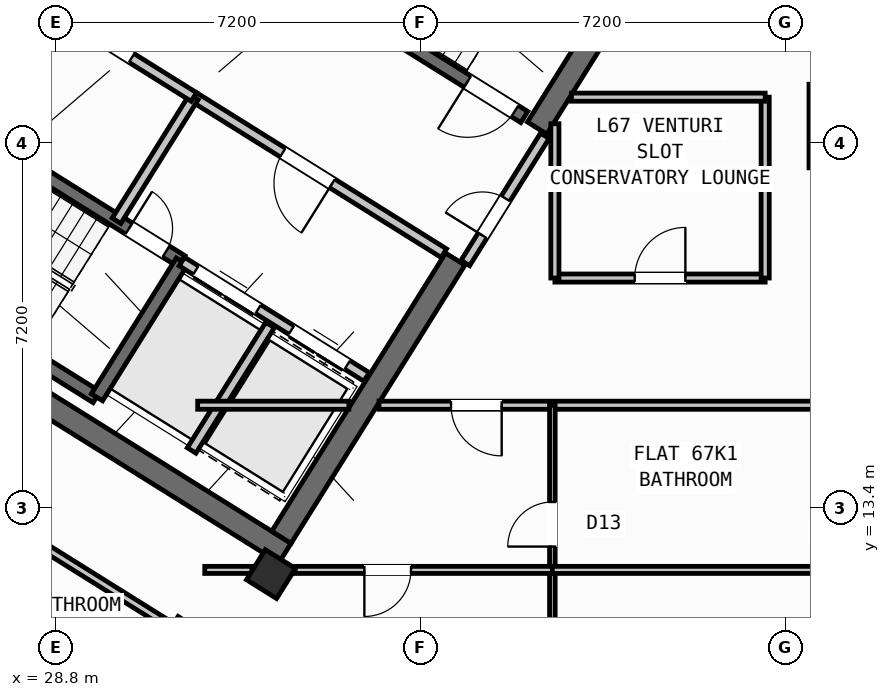
"""IFC4 building model, lengths in metres.
Left out: names, types, materials, properties, quantities, classifications, styles, units other than length and angle.
Written with IfcOpenShell. Run it as: python <this file> out.ifc"""

import sys

from ifc_helpers import new_model, si_unit, direction, frame, frame_2d, origin, origin_2d, place, context, subcontext, project, spatial, rectangle, hollow_rectangle, extrude, source, transform, mapped, element, fill, save


model = new_model("IFC4")
c1 = context("Model", 3, precision=1e-05, world=origin(), true_north=direction((0.0, 1.0)))
c2 = subcontext(c1, "Body", "Model", "MODEL_VIEW")
j1 = project(units=[si_unit("LENGTHUNIT", "METRE"), si_unit("PLANEANGLEUNIT", "RADIAN")], contexts=[c1])
p1 = place(None, origin())
s1 = spatial("IfcSite", under=j1, at=p1, CompositionType="ELEMENT")
p2 = place(p1, origin())
s2 = spatial("IfcBuilding", under=s1, at=p2, CompositionType="ELEMENT")
p3 = place(p2, frame((0.0, 0.0, 266.4)))
s3 = spatial("IfcBuildingStorey", under=s2, at=p3, CompositionType="ELEMENT", Elevation=266.4)
p4 = place(p3, frame((33.324, 12.503, 0.0), z_axis=(0.0, 0.0, 1.0), x_axis=(-0.848043529849, 0.529926571782, 0.0)))
e1 = element("IfcWall", 1, at=p4, inside=s3, PredefinedType="SHEAR", context=c2, shape_type="SweptSolid", body=[
    extrude(rectangle(XDim=13.04, YDim=0.45, at=frame_2d((6.52, 0.0))), origin(), (0.0, 0.0, 1.0), 3.35),
])
p5 = place(p3, frame((40.221, 23.965, 0.0), z_axis=(0.0, 0.0, 1.0), x_axis=(-0.529902075036, -0.848058836916, 0.0)))
e2 = element("IfcWall", 2, at=p5, inside=s3, PredefinedType="SHEAR", context=c2, shape_type="SweptSolid", body=[
    extrude(rectangle(XDim=3.625, YDim=0.45, at=frame_2d((1.812, 0.0))), origin(), (0.0, 0.0, 1.0), 3.35),
])
p6 = place(p3, frame((36.683, 18.304, 0.0), z_axis=(0.0, 0.0, 1.0), x_axis=(-0.529904039071, -0.848057609704, 0.0)))
e3 = element("IfcWall", 3, at=p6, inside=s3, PredefinedType="SHEAR", context=c2, shape_type="SweptSolid", body=[
    extrude(rectangle(XDim=6.475, YDim=0.45, at=frame_2d((3.238, 0.0))), origin(), (0.0, 0.0, 1.0), 3.35),
])
m1 = source(origin(), c2, "Body", "SweptSolid", [
    extrude(hollow_rectangle(XDim=0.7, YDim=0.7, WallThickness=0.028, at=origin_2d()), origin(), (0.0, 0.0, 1.0), 3.6),
])
p7 = place(p3, frame((33.046, 12.087, 0.0), z_axis=(0.0, 0.0, 1.0), x_axis=(-0.848048096156, 0.529919264233, 0.0)))
e4 = element("IfcColumn", 4, at=p7, inside=s3, PredefinedType="COLUMN", context=c2, shape_type="MappedRepresentation", body=[
    mapped(m1, transform((0.0, 0.0, 0.0), scale=1.0)),
])
p8 = place(p3, frame((29.268, 6.429, 0.0), z_axis=(0.0, 0.0, 1.0), x_axis=(-0.848049971435, 0.529916263149, 0.0)))
e5 = element("IfcWall", 5, at=p8, inside=s3, PredefinedType="STANDARD", context=c2, shape_type="SweptSolid", body=[
    extrude(rectangle(XDim=31.588, YDim=0.32, at=frame_2d((15.794, 0.0))), origin(), (0.0, 0.0, 1.0), 3.35),
])
p9 = place(p8, frame((16.362, 0.0, 0.0)))
e6 = element("IfcOpeningElement", 6, at=p9, cuts=e5, PredefinedType="OPENING", context=c2, shape_type="SweptSolid", body=[
    extrude(rectangle(XDim=1.2, YDim=2.15, at=frame_2d((0.6, 1.075))), frame((0.0, 0.17, 0.0), z_axis=(0.0, -1.0, 0.0), x_axis=(1.0, 0.0, 0.0)), (0.0, 0.0, 1.0), 0.34),
])
p10 = place(p8, frame((3.859, 0.0, 0.9)))
e7 = element("IfcOpeningElement", 7, at=p10, cuts=e5, PredefinedType="OPENING", context=c2, shape_type="SweptSolid", body=[
    extrude(rectangle(XDim=1.65, YDim=1.45, at=frame_2d((0.825, 0.725))), frame((0.0, 0.17, 0.0), z_axis=(0.0, -1.0, 0.0), x_axis=(1.0, 0.0, 0.0)), (0.0, 0.0, 1.0), 0.34),
])
p11 = place(p8, frame((10.519, 0.0, 0.9)))
e8 = element("IfcOpeningElement", 8, at=p11, cuts=e5, PredefinedType="OPENING", context=c2, shape_type="SweptSolid", body=[
    extrude(rectangle(XDim=1.65, YDim=1.45, at=frame_2d((0.825, 0.725))), frame((0.0, 0.17, 0.0), z_axis=(0.0, -1.0, 0.0), x_axis=(1.0, 0.0, 0.0)), (0.0, 0.0, 1.0), 0.34),
])
p12 = place(p8, frame((21.219, 0.0, 0.95)))
e9 = element("IfcOpeningElement", 9, at=p12, cuts=e5, PredefinedType="OPENING", context=c2, shape_type="SweptSolid", body=[
    extrude(rectangle(XDim=1.95, YDim=1.35, at=frame_2d((0.975, 0.675))), frame((0.0, 0.17, 0.0), z_axis=(0.0, -1.0, 0.0), x_axis=(1.0, 0.0, 0.0)), (0.0, 0.0, 1.0), 0.34),
])
p13 = place(p8, frame((26.406, 0.0, 1.0)))
e10 = element("IfcOpeningElement", 10, at=p13, cuts=e5, PredefinedType="OPENING", context=c2, shape_type="SweptSolid", body=[
    extrude(rectangle(XDim=0.9, YDim=1.25, at=frame_2d((0.45, 0.625))), frame((0.0, 0.17, 0.0), z_axis=(0.0, -1.0, 0.0), x_axis=(1.0, 0.0, 0.0)), (0.0, 0.0, 1.0), 0.34),
])
p14 = place(p8, frame((29.143, 0.0, 0.9)))
e11 = element("IfcOpeningElement", 11, at=p14, cuts=e5, PredefinedType="OPENING", context=c2, shape_type="SweptSolid", body=[
    extrude(rectangle(XDim=1.65, YDim=1.45, at=frame_2d((0.825, 0.725))), frame((0.0, 0.17, 0.0), z_axis=(0.0, -1.0, 0.0), x_axis=(1.0, 0.0, 0.0)), (0.0, 0.0, 1.0), 0.34),
])
p15 = place(p3, frame((29.605, 15.581, 0.0), z_axis=(0.0, 0.0, 1.0), x_axis=(-0.848036911448, 0.529937163087, 0.0)))
e12 = element("IfcWall", 12, at=p15, inside=s3, PredefinedType="SHEAR", context=c2, shape_type="SweptSolid", body=[
    extrude(rectangle(XDim=7.46, YDim=0.26, at=frame_2d((3.73, 0.0))), origin(), (0.0, 0.0, 1.0), 3.35),
])
p16 = place(p3, frame((31.28, 18.261, 0.0), z_axis=(0.0, 0.0, 1.0), x_axis=(-0.848051618787, 0.529913626805, 0.0)))
e13 = element("IfcWall", 13, at=p16, inside=s3, PredefinedType="SHEAR", context=c2, shape_type="SweptSolid", body=[
    extrude(rectangle(XDim=7.46, YDim=0.26, at=frame_2d((3.73, 0.0))), origin(), (0.0, 0.0, 1.0), 3.35),
])
p17 = place(p16, frame((0.36, 0.0, 0.0)))
e14 = element("IfcOpeningElement", 14, at=p17, cuts=e13, PredefinedType="OPENING", context=c2, shape_type="SweptSolid", body=[
    extrude(rectangle(XDim=0.86, YDim=2.05, at=frame_2d((0.43, 1.025))), frame((0.0, 0.14, 0.0), z_axis=(0.0, -1.0, 0.0), x_axis=(1.0, 0.0, 0.0)), (0.0, 0.0, 1.0), 0.28),
])
p18 = place(p3, frame((31.288, 18.256, 0.0), z_axis=(0.0, 0.0, 1.0), x_axis=(-0.529943379326, -0.848033026897, 0.0)))
e15 = element("IfcWall", 15, at=p18, inside=s3, PredefinedType="SHEAR", context=c2, shape_type="SweptSolid", body=[
    extrude(rectangle(XDim=3.16, YDim=0.26, at=frame_2d((1.58, 0.0))), origin(), (0.0, 0.0, 1.0), 3.35),
])
p19 = place(p3, frame((38.046, 21.108, 0.0), z_axis=(0.0, 0.0, 1.0), x_axis=(-0.848054434086, 0.529909121291, 0.0)))
e16 = element("IfcWall", 16, at=p19, inside=s3, PredefinedType="SHEAR", context=c2, shape_type="SweptSolid", body=[
    extrude(rectangle(XDim=7.33, YDim=0.26, at=frame_2d((3.665, 0.0))), origin(), (0.0, 0.0, 1.0), 3.35),
])
p20 = place(p19, frame((0.22, 0.0, 0.0)))
e17 = element("IfcOpeningElement", 17, at=p20, cuts=e16, PredefinedType="OPENING", context=c2, shape_type="SweptSolid", body=[
    extrude(rectangle(XDim=1.1, YDim=2.1, at=frame_2d((0.55, 1.05))), frame((0.0, 0.14, 0.0), z_axis=(0.0, -1.0, 0.0), x_axis=(1.0, 0.0, 0.0)), (0.0, 0.0, 1.0), 0.28),
])
p21 = place(p3, frame((34.933, 15.978, 0.0), z_axis=(0.0, 0.0, 1.0), x_axis=(-0.848055739377, 0.529907032327, 0.0)))
e18 = element("IfcWall", 18, at=p21, inside=s3, PredefinedType="STANDARD", context=c2, shape_type="SweptSolid", body=[
    extrude(rectangle(XDim=4.298, YDim=0.2, at=frame_2d((2.149, 0.0))), origin(), (0.0, 0.0, 1.0), 3.34),
])
p22 = place(p21, frame((0.448, 0.0, 0.0)))
e19 = element("IfcOpeningElement", 19, at=p22, cuts=e18, PredefinedType="OPENING", context=c2, shape_type="SweptSolid", body=[
    extrude(rectangle(XDim=1.3, YDim=2.2, at=frame_2d((0.65, 1.1))), frame((0.0, 0.11, 0.0), z_axis=(0.0, -1.0, 0.0), x_axis=(1.0, 0.0, 0.0)), (0.0, 0.0, 1.0), 0.22),
])
p23 = place(p21, frame((2.523, 0.0, 0.0)))
e20 = element("IfcOpeningElement", 20, at=p23, cuts=e18, PredefinedType="OPENING", context=c2, shape_type="SweptSolid", body=[
    extrude(rectangle(XDim=1.45, YDim=2.25, at=frame_2d((0.725, 1.125))), frame((0.0, 0.11, 0.0), z_axis=(0.0, -1.0, 0.0), x_axis=(1.0, 0.0, 0.0)), (0.0, 0.0, 1.0), 0.22),
])
p24 = place(p3, frame((36.459, 18.421, 0.0), z_axis=(0.0, 0.0, 1.0), x_axis=(-0.848059591691, 0.529900867089, 0.0)))
e21 = element("IfcWall", 21, at=p24, inside=s3, PredefinedType="STANDARD", context=c2, shape_type="SweptSolid", body=[
    extrude(rectangle(XDim=5.818, YDim=0.2, at=frame_2d((2.909, 0.0))), origin(), (0.0, 0.0, 1.0), 3.34),
])
p25 = place(p24, frame((2.598, 0.0, 0.0)))
e22 = element("IfcOpeningElement", 22, at=p25, cuts=e21, PredefinedType="OPENING", context=c2, shape_type="SweptSolid", body=[
    extrude(rectangle(XDim=1.15, YDim=2.1, at=frame_2d((0.575, 1.05))), frame((0.0, 0.11, 0.0), z_axis=(0.0, -1.0, 0.0), x_axis=(1.0, 0.0, 0.0)), (0.0, 0.0, 1.0), 0.22),
])
p26 = place(p3, frame((33.029, 17.003, 0.0), z_axis=(0.0, 0.0, 1.0), x_axis=(-0.529916267533, -0.848049968695, 0.0)))
e23 = element("IfcWall", 23, at=p26, inside=s3, PredefinedType="STANDARD", context=c2, shape_type="SweptSolid", body=[
    extrude(rectangle(XDim=2.92, YDim=0.2, at=frame_2d((1.46, 0.0))), origin(), (0.0, 0.0, 1.0), 3.34),
])
for number, where, z_axis, x_axis in (
    (24, (31.525, 21.504, 0.0), (0.0, 0.0, 1.0), (-0.53, -0.848, 0.0)),
    (25, (28.71, 23.263, 0.0), (0.0, 0.0, 1.0), (-0.53, -0.848, 0.0)),
):
    element("IfcWall", number, at=place(p3, frame(where, z_axis=z_axis, x_axis=x_axis)), inside=s3, PredefinedType="STANDARD", context=c2, shape_type="SweptSolid", body=[
        extrude(rectangle(XDim=2.88, YDim=0.2, at=frame_2d((1.44, 0.0))), origin(), (0.0, 0.0, 1.0), 3.34),
    ])
p27 = place(p3, frame((31.525, 21.504, 0.0), z_axis=(0.0, 0.0, 1.0), x_axis=(-0.848042066329, 0.529928913853, 0.0)))
e26 = element("IfcWall", 26, at=p27, inside=s3, PredefinedType="STANDARD", context=c2, shape_type="SweptSolid", body=[
    extrude(rectangle(XDim=6.268, YDim=0.2, at=frame_2d((3.134, 0.0))), origin(), (0.0, 0.0, 1.0), 3.34),
])
p28 = place(p27, frame((4.4, 0.0, 0.0)))
e27 = element("IfcOpeningElement", 27, at=p28, cuts=e26, PredefinedType="OPENING", context=c2, shape_type="SweptSolid", body=[
    extrude(rectangle(XDim=0.86, YDim=2.05, at=frame_2d((0.43, 1.025))), frame((0.0, 0.11, 0.0), z_axis=(0.0, -1.0, 0.0), x_axis=(1.0, 0.0, 0.0)), (0.0, 0.0, 1.0), 0.22),
])
p29 = place(p27, frame((1.45, 0.0, 0.0)))
e28 = element("IfcOpeningElement", 28, at=p29, cuts=e26, PredefinedType="OPENING", context=c2, shape_type="SweptSolid", body=[
    extrude(rectangle(XDim=0.86, YDim=2.05, at=frame_2d((0.43, 1.025))), frame((0.0, 0.11, 0.0), z_axis=(0.0, -1.0, 0.0), x_axis=(1.0, 0.0, 0.0)), (0.0, 0.0, 1.0), 0.22),
])
p30 = place(p3, frame((32.164, 10.374, 0.0), z_axis=(0.0, 0.0, 1.0), x_axis=(-0.848044107957, 0.529925646633, 0.0)))
e29 = element("IfcWall", 29, at=p30, inside=s3, PredefinedType="PARTITIONING", context=c2, shape_type="SweptSolid", body=[
    extrude(rectangle(XDim=15.57, YDim=0.16, at=frame_2d((7.785, 0.0))), origin(), (0.0, 0.0, 1.0), 3.34),
])
p31 = place(p30, frame((10.83, 0.0, 0.0)))
e30 = element("IfcOpeningElement", 30, at=p31, cuts=e29, PredefinedType="OPENING", context=c2, shape_type="SweptSolid", body=[
    extrude(rectangle(XDim=1.0, YDim=2.1, at=frame_2d((0.5, 1.05))), frame((0.0, 0.09, 0.0), z_axis=(0.0, -1.0, 0.0), x_axis=(1.0, 0.0, 0.0)), (0.0, 0.0, 1.0), 0.18),
])
p32 = place(p3, frame((31.282, 11.208, 0.0), z_axis=(0.0, 0.0, 1.0), x_axis=(-0.529938869374, -0.84803584519, 0.0)))
e31 = element("IfcWall", 31, at=p32, inside=s3, PredefinedType="PARTITIONING", context=c2, shape_type="SweptSolid", body=[
    extrude(rectangle(XDim=5.48, YDim=0.16, at=frame_2d((2.74, 0.0))), origin(), (0.0, 0.0, 1.0), 3.34),
])
p33 = place(p3, frame((29.72, 8.859, 0.0), z_axis=(0.0, 0.0, 1.0), x_axis=(-0.848049134363, 0.529917602752, 0.0)))
e32 = element("IfcWall", 32, at=p33, inside=s3, PredefinedType="PLUMBINGWALL", context=c2, shape_type="SweptSolid", body=[
    extrude(rectangle(XDim=14.3, YDim=0.14, at=frame_2d((7.15, 0.0))), origin(), (0.0, 0.0, 1.0), 3.34),
])
p34 = place(p33, frame((9.57, 0.0, 0.0)))
e33 = element("IfcOpeningElement", 33, at=p34, cuts=e32, PredefinedType="OPENING", context=c2, shape_type="SweptSolid", body=[
    extrude(rectangle(XDim=0.92, YDim=2.08, at=frame_2d((0.46, 1.04))), frame((0.0, 0.08, 0.0), z_axis=(0.0, -1.0, 0.0), x_axis=(1.0, 0.0, 0.0)), (0.0, 0.0, 1.0), 0.16),
])
p35 = place(p3, frame((38.451, 20.737, 0.0), z_axis=(0.0, 0.0, 1.0), x_axis=(-0.529924799939, -0.848044637038, 0.0)))
e34 = element("IfcWall", 34, at=p35, inside=s3, PredefinedType="STANDARD", context=c2, shape_type="SweptSolid", body=[
    extrude(rectangle(XDim=2.96, YDim=0.2, at=frame_2d((1.48, 0.0))), origin(), (0.0, 0.0, 1.0), 3.34),
])
p36 = place(p35, frame((1.46, 0.0, 0.0)))
e35 = element("IfcOpeningElement", 35, at=p36, cuts=e34, PredefinedType="OPENING", context=c2, shape_type="SweptSolid", body=[
    extrude(rectangle(XDim=0.86, YDim=2.05, at=frame_2d((0.43, 1.025))), frame((0.0, 0.11, 0.0), z_axis=(0.0, -1.0, 0.0), x_axis=(1.0, 0.0, 0.0)), (0.0, 0.0, 1.0), 0.22),
])
p37 = place(p3, frame((31.6, 15.42, 0.0), z_axis=(0.0, 0.0, 1.0), x_axis=(1.0, 0.0, 0.0)))
e36 = element("IfcWall", 36, at=p37, inside=s3, PredefinedType="PARTITIONING", context=c2, shape_type="SweptSolid", body=[
    extrude(rectangle(XDim=2.984, YDim=0.16, at=frame_2d((1.492, 0.0))), origin(), (0.0, 0.0, 1.0), 3.34),
])
p38 = place(p3, frame((35.178, 15.42, 0.0), z_axis=(0.0, 0.0, 1.0), x_axis=(1.0, 0.0, 0.0)))
e37 = element("IfcWall", 37, at=p38, inside=s3, PredefinedType="PARTITIONING", context=c2, shape_type="SweptSolid", body=[
    extrude(rectangle(XDim=9.021, YDim=0.16, at=frame_2d((4.511, 0.0))), origin(), (0.0, 0.0, 1.0), 3.34),
])
p39 = place(p38, frame((1.422, 0.0, 0.0)))
e38 = element("IfcOpeningElement", 38, at=p39, cuts=e37, PredefinedType="OPENING", context=c2, shape_type="SweptSolid", body=[
    extrude(rectangle(XDim=1.0, YDim=2.1, at=frame_2d((0.5, 1.05))), frame((0.0, 0.09, 0.0), z_axis=(0.0, -1.0, 0.0), x_axis=(1.0, 0.0, 0.0)), (0.0, 0.0, 1.0), 0.18),
])
p40 = place(p3, frame((38.65, 17.93, 0.0), z_axis=(0.0, 0.0, 1.0), x_axis=(1.0, 0.0, 0.0)))
e39 = element("IfcWall", 39, at=p40, inside=s3, PredefinedType="PARTITIONING", context=c2, shape_type="SweptSolid", body=[
    extrude(rectangle(XDim=4.15, YDim=0.16, at=frame_2d((2.075, 0.0))), origin(), (0.0, 0.0, 1.0), 3.34),
])
p41 = place(p40, frame((1.575, 0.0, 0.0)))
e40 = element("IfcOpeningElement", 40, at=p41, cuts=e39, PredefinedType="OPENING", context=c2, shape_type="SweptSolid", body=[
    extrude(rectangle(XDim=1.0, YDim=2.1, at=frame_2d((0.5, 1.05))), frame((0.0, 0.09, 0.0), z_axis=(0.0, -1.0, 0.0), x_axis=(1.0, 0.0, 0.0)), (0.0, 0.0, 1.0), 0.18),
])
p42 = place(p3, frame((38.65, 17.93, 0.0), z_axis=(0.0, 0.0, 1.0), x_axis=(0.0, 1.0, 0.0)))
e41 = element("IfcWall", 41, at=p42, inside=s3, PredefinedType="PARTITIONING", context=c2, shape_type="SweptSolid", body=[
    extrude(rectangle(XDim=3.046, YDim=0.16, at=frame_2d((1.523, 0.0))), origin(), (0.0, 0.0, 1.0), 3.34),
])
p43 = place(p3, frame((42.8, 17.93, 0.0), z_axis=(0.0, 0.0, 1.0), x_axis=(0.0, 1.0, 0.0)))
e42 = element("IfcWall", 42, at=p43, inside=s3, PredefinedType="PARTITIONING", context=c2, shape_type="SweptSolid", body=[
    extrude(rectangle(XDim=3.57, YDim=0.16, at=frame_2d((1.785, 0.0))), origin(), (0.0, 0.0, 1.0), 3.34),
])
p44 = place(p3, frame((38.978, 21.5, 0.0), z_axis=(0.0, 0.0, 1.0), x_axis=(1.0, 0.0, 0.0)))
e43 = element("IfcWall", 43, at=p44, inside=s3, PredefinedType="PARTITIONING", context=c2, shape_type="SweptSolid", body=[
    extrude(rectangle(XDim=3.823, YDim=0.16, at=frame_2d((1.911, 0.0))), origin(), (0.0, 0.0, 1.0), 3.34),
])
p45 = place(p3, frame((38.6, 1.96, 0.0), z_axis=(0.0, 0.0, 1.0), x_axis=(0.0, 1.0, 0.0)))
e44 = element("IfcWall", 44, at=p45, inside=s3, PredefinedType="PARTITIONING", context=c2, shape_type="SweptSolid", body=[
    extrude(rectangle(XDim=13.46, YDim=0.11, at=frame_2d((6.73, 0.0))), origin(), (0.0, 0.0, 1.0), 3.34),
])
p46 = place(p45, frame((5.2, 0.0, 0.0)))
e45 = element("IfcOpeningElement", 45, at=p46, cuts=e44, PredefinedType="OPENING", context=c2, shape_type="SweptSolid", body=[
    extrude(rectangle(XDim=0.92, YDim=2.08, at=frame_2d((0.46, 1.04))), frame((0.0, 0.065, 0.0), z_axis=(0.0, -1.0, 0.0), x_axis=(1.0, 0.0, 0.0)), (0.0, 0.0, 1.0), 0.13),
])
p47 = place(p45, frame((10.67, 0.0, 0.0)))
e46 = element("IfcOpeningElement", 46, at=p47, cuts=e44, PredefinedType="OPENING", context=c2, shape_type="SweptSolid", body=[
    extrude(rectangle(XDim=0.88, YDim=2.08, at=frame_2d((0.44, 1.04))), frame((0.0, 0.065, 0.0), z_axis=(0.0, -1.0, 0.0), x_axis=(1.0, 0.0, 0.0)), (0.0, 0.0, 1.0), 0.13),
])
p48 = place(p3, frame((31.74, 12.17, 0.0), z_axis=(0.0, 0.0, 1.0), x_axis=(1.0, 0.0, 0.0)))
e47 = element("IfcWall", 47, at=p48, inside=s3, PredefinedType="PLUMBINGWALL", context=c2, shape_type="SweptSolid", body=[
    extrude(rectangle(XDim=0.931, YDim=0.14, at=frame_2d((0.466, 0.0))), origin(), (0.0, 0.0, 1.0), 3.34),
])
p49 = place(p3, frame((33.525, 12.17, 0.0), z_axis=(0.0, 0.0, 1.0), x_axis=(1.0, 0.0, 0.0)))
e48 = element("IfcWall", 48, at=p49, inside=s3, PredefinedType="PLUMBINGWALL", context=c2, shape_type="SweptSolid", body=[
    extrude(rectangle(XDim=5.075, YDim=0.14, at=frame_2d((2.538, 0.0))), origin(), (0.0, 0.0, 1.0), 3.34),
])
p50 = place(p49, frame((1.365, 0.0, 0.0)))
e49 = element("IfcOpeningElement", 49, at=p50, cuts=e48, PredefinedType="OPENING", context=c2, shape_type="SweptSolid", body=[
    extrude(rectangle(XDim=0.92, YDim=2.08, at=frame_2d((0.46, 1.04))), frame((0.0, 0.08, 0.0), z_axis=(0.0, -1.0, 0.0), x_axis=(1.0, 0.0, 0.0)), (0.0, 0.0, 1.0), 0.16),
])
p51 = place(p3, frame((38.6, 12.17, 0.0), z_axis=(0.0, 0.0, 1.0), x_axis=(1.0, 0.0, 0.0)))
e50 = element("IfcWall", 50, at=p51, inside=s3, PredefinedType="PLUMBINGWALL", context=c2, shape_type="SweptSolid", body=[
    extrude(rectangle(XDim=5.46, YDim=0.14, at=frame_2d((2.73, 0.0))), origin(), (0.0, 0.0, 1.0), 3.34),
])
m2 = source(origin(), c2, "Body", "SweptSolid", [
    extrude(rectangle(XDim=0.86, YDim=2.05, at=frame_2d((0.43, 1.025))), frame((0.0, 0.025, 0.0), z_axis=(0.0, -1.0, 0.0), x_axis=(1.0, 0.0, 0.0)), (0.0, 0.0, 1.0), 0.05),
])
p52 = place(p17, frame((0.86, 0.0, 0.0), z_axis=(0.0, 0.0, 1.0), x_axis=(-1.0, 0.0, 0.0)))
e51 = element("IfcDoor", 51, at=p52, inside=s3, OperationType="SINGLE_SWING_LEFT", PredefinedType="DOOR", context=c2, shape_type="MappedRepresentation", body=[
    mapped(m2, transform((0.0, 0.0, 0.0), scale=1.0)),
])
fill(e14, e51)
m3 = source(origin(), c2, "Body", "SweptSolid", [
    extrude(rectangle(XDim=1.1, YDim=2.1, at=frame_2d((0.55, 1.05))), frame((0.0, 0.025, 0.0), z_axis=(0.0, -1.0, 0.0), x_axis=(1.0, 0.0, 0.0)), (0.0, 0.0, 1.0), 0.05),
])
p53 = place(p20, origin())
e52 = element("IfcDoor", 52, at=p53, inside=s3, OperationType="SINGLE_SWING_RIGHT", PredefinedType="DOOR", context=c2, shape_type="MappedRepresentation", body=[
    mapped(m3, transform((0.0, 0.0, 0.0), scale=1.0)),
])
fill(e17, e52)
m4 = source(origin(), c2, "Body", "SweptSolid", [
    extrude(rectangle(XDim=1.15, YDim=2.1, at=frame_2d((0.575, 1.05))), frame((0.0, 0.025, 0.0), z_axis=(0.0, -1.0, 0.0), x_axis=(1.0, 0.0, 0.0)), (0.0, 0.0, 1.0), 0.05),
])
p54 = place(p25, origin())
e53 = element("IfcDoor", 53, at=p54, inside=s3, OperationType="SINGLE_SWING_LEFT", PredefinedType="DOOR", context=c2, shape_type="MappedRepresentation", body=[
    mapped(m4, transform((0.0, 0.0, 0.0), scale=1.0)),
])
fill(e22, e53)
m5 = source(origin(), c2, "Body", "SweptSolid", [
    extrude(rectangle(XDim=1.3, YDim=2.2, at=frame_2d((0.65, 1.1))), frame((0.0, 0.025, 0.0), z_axis=(0.0, -1.0, 0.0), x_axis=(1.0, 0.0, 0.0)), (0.0, 0.0, 1.0), 0.05),
])
p55 = place(p22, origin())
e54 = element("IfcDoor", 54, at=p55, inside=s3, OperationType="DOUBLE_DOOR_SLIDING", PredefinedType="DOOR", context=c2, shape_type="MappedRepresentation", body=[
    mapped(m5, transform((0.0, 0.0, 0.0), scale=1.0)),
])
fill(e19, e54)
m6 = source(origin(), c2, "Body", "SweptSolid", [
    extrude(rectangle(XDim=1.45, YDim=2.25, at=frame_2d((0.725, 1.125))), frame((0.0, 0.025, 0.0), z_axis=(0.0, -1.0, 0.0), x_axis=(1.0, 0.0, 0.0)), (0.0, 0.0, 1.0), 0.05),
])
p56 = place(p23, origin())
e55 = element("IfcDoor", 55, at=p56, inside=s3, OperationType="DOUBLE_DOOR_SLIDING", PredefinedType="DOOR", context=c2, shape_type="MappedRepresentation", body=[
    mapped(m6, transform((0.0, 0.0, 0.0), scale=1.0)),
])
fill(e20, e55)
p57 = place(p29, frame((0.86, 0.0, 0.0), z_axis=(0.0, 0.0, 1.0), x_axis=(-1.0, 0.0, 0.0)))
e56 = element("IfcDoor", 56, at=p57, inside=s3, OperationType="SINGLE_SWING_LEFT", PredefinedType="DOOR", context=c2, shape_type="MappedRepresentation", body=[
    mapped(m2, transform((0.0, 0.0, 0.0), scale=1.0)),
])
fill(e28, e56)
m7 = source(origin(), c2, "Body", "SweptSolid", [
    extrude(rectangle(XDim=1.0, YDim=2.1, at=frame_2d((0.5, 1.05))), frame((0.0, 0.025, 0.0), z_axis=(0.0, -1.0, 0.0), x_axis=(1.0, 0.0, 0.0)), (0.0, 0.0, 1.0), 0.05),
])
p58 = place(p41, origin())
e57 = element("IfcDoor", 57, at=p58, inside=s3, OperationType="SINGLE_SWING_RIGHT", PredefinedType="DOOR", context=c2, shape_type="MappedRepresentation", body=[
    mapped(m7, transform((0.0, 0.0, 0.0), scale=1.0)),
])
fill(e40, e57)
p59 = place(p36, frame((0.86, 0.0, 0.0), z_axis=(0.0, 0.0, 1.0), x_axis=(-1.0, 0.0, 0.0)))
e58 = element("IfcDoor", 58, at=p59, inside=s3, OperationType="SINGLE_SWING_LEFT", PredefinedType="DOOR", context=c2, shape_type="MappedRepresentation", body=[
    mapped(m2, transform((0.0, 0.0, 0.0), scale=1.0)),
])
fill(e35, e58)
p60 = place(p39, frame((1.0, 0.0, 0.0), z_axis=(0.0, 0.0, 1.0), x_axis=(-1.0, 0.0, 0.0)))
e59 = element("IfcDoor", 59, at=p60, inside=s3, OperationType="SINGLE_SWING_LEFT", PredefinedType="DOOR", context=c2, shape_type="MappedRepresentation", body=[
    mapped(m7, transform((0.0, 0.0, 0.0), scale=1.0)),
])
fill(e38, e59)
m8 = source(origin(), c2, "Body", "SweptSolid", [
    extrude(rectangle(XDim=0.92, YDim=2.08, at=frame_2d((0.46, 1.04))), frame((0.0, 0.025, 0.0), z_axis=(0.0, -1.0, 0.0), x_axis=(1.0, 0.0, 0.0)), (0.0, 0.0, 1.0), 0.05),
])
p61 = place(p50, frame((0.92, 0.0, 0.0), z_axis=(0.0, 0.0, 1.0), x_axis=(-1.0, 0.0, 0.0)))
e60 = element("IfcDoor", 60, at=p61, inside=s3, OperationType="SINGLE_SWING_RIGHT", PredefinedType="DOOR", context=c2, shape_type="MappedRepresentation", body=[
    mapped(m8, transform((0.0, 0.0, 0.0), scale=1.0)),
])
fill(e49, e60)
m9 = source(origin(), c2, "Body", "SweptSolid", [
    extrude(rectangle(XDim=0.88, YDim=2.08, at=frame_2d((0.44, 1.04))), frame((0.0, 0.025, 0.0), z_axis=(0.0, -1.0, 0.0), x_axis=(1.0, 0.0, 0.0)), (0.0, 0.0, 1.0), 0.05),
])
p62 = place(p47, origin())
e61 = element("IfcDoor", 61, at=p62, inside=s3, OperationType="SINGLE_SWING_LEFT", PredefinedType="DOOR", context=c2, shape_type="MappedRepresentation", body=[
    mapped(m9, transform((0.0, 0.0, 0.0), scale=1.0)),
])
fill(e46, e61)
save(model, sys.argv[1])
